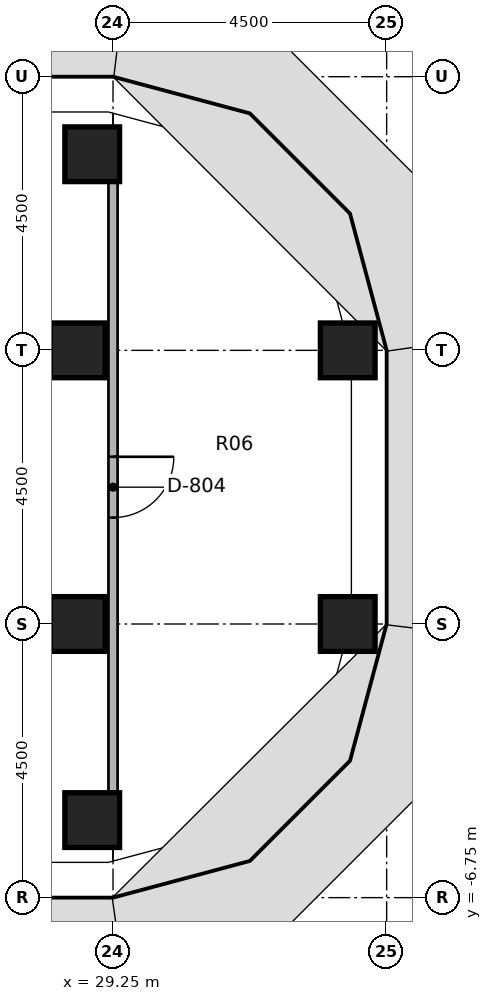
"""IFC4 building model, lengths in metres.
Left out: names, types, materials, properties, quantities, classifications, styles, units other than length and angle.
Written with IfcOpenShell. Run it as: python <this file> out.ifc"""

import sys

from ifc_helpers import new_model, si_unit, direction, frame, frame_2d, origin, origin_2d, place, context, subcontext, project, spatial, rectangle, extrude, element, fill, save


model = new_model("IFC4")
c1 = context("Model", 3, precision=1e-05, world=origin(), true_north=direction((0.0, 1.0)))
c2 = subcontext(c1, "Body", "Model", "MODEL_VIEW")
j1 = project(units=[si_unit("LENGTHUNIT", "METRE"), si_unit("PLANEANGLEUNIT", "RADIAN")], contexts=[c1])
p1 = place(None, origin())
s1 = spatial("IfcSite", under=j1, at=p1, CompositionType="ELEMENT")
p2 = place(p1, origin())
s2 = spatial("IfcBuilding", under=s1, at=p2, CompositionType="ELEMENT")
p3 = place(p2, frame((0.0, 0.0, 98.0)))
s3 = spatial("IfcBuildingStorey", under=s2, at=p3, CompositionType="ELEMENT", Elevation=98.0)
for number, where, z_axis, x_axis in (
    (1, (28.908, -5.475, 0.0), (0.0, 0.0, 1.0), (1.0, 0.0, 0.0)),
    (2, (28.67, -2.25, 0.0), (0.0, 0.0, 1.0), (1.0, 0.0, 0.0)),
    (3, (28.67, 2.25, 0.0), (0.0, 0.0, 1.0), (1.0, 0.0, 0.0)),
    (4, (28.908, 5.475, 0.0), (0.0, 0.0, 1.0), (1.0, 0.0, 0.0)),
    (5, (33.11, -2.25, 0.0), (0.0, 0.0, 1.0), (1.0, 0.0, 0.0)),
    (6, (33.11, 2.25, 0.0), (0.0, 0.0, 1.0), (1.0, 0.0, 0.0)),
):
    element("IfcColumn", number, at=place(p3, frame(where, z_axis=z_axis, x_axis=x_axis)), inside=s3, PredefinedType="COLUMN", context=c2, shape_type="SweptSolid", body=[
        extrude(rectangle(XDim=0.9, YDim=0.9, at=origin_2d()), origin(), (0.0, 0.0, 1.0), 3.65),
    ])
p4 = place(p3, frame((29.25, 5.025, 0.0), z_axis=(0.0, 0.0, 1.0), x_axis=(0.0, -1.0, 0.0)))
e7 = element("IfcWall", 7, at=p4, inside=s3, PredefinedType="PARTITIONING", context=c2, shape_type="SweptSolid", body=[
    extrude(rectangle(XDim=10.05, YDim=0.15, at=frame_2d((5.025, 0.0))), origin(), (0.0, 0.0, 1.0), 2.738),
])
p5 = place(p4, frame((4.525, 0.0, 0.0)))
e8 = element("IfcOpeningElement", 8, at=p5, cuts=e7, PredefinedType="OPENING", context=c2, shape_type="SweptSolid", body=[
    extrude(rectangle(XDim=1.0, YDim=2.1, at=frame_2d((0.5, 1.05))), frame((0.0, 0.085, 0.0), z_axis=(0.0, -1.0, 0.0), x_axis=(1.0, 0.0, 0.0)), (0.0, 0.0, 1.0), 0.17),
])
p6 = place(p5, origin())
e9 = element("IfcDoor", 9, at=p6, inside=s3, OperationType="SINGLE_SWING_RIGHT", PredefinedType="DOOR", context=c2, shape_type="SweptSolid", body=[
    extrude(rectangle(XDim=1.0, YDim=2.1, at=frame_2d((0.5, 1.05))), frame((0.0, 0.025, 0.0), z_axis=(0.0, -1.0, 0.0), x_axis=(1.0, 0.0, 0.0)), (0.0, 0.0, 1.0), 0.05),
])
fill(e8, e9)
save(model, sys.argv[1])
